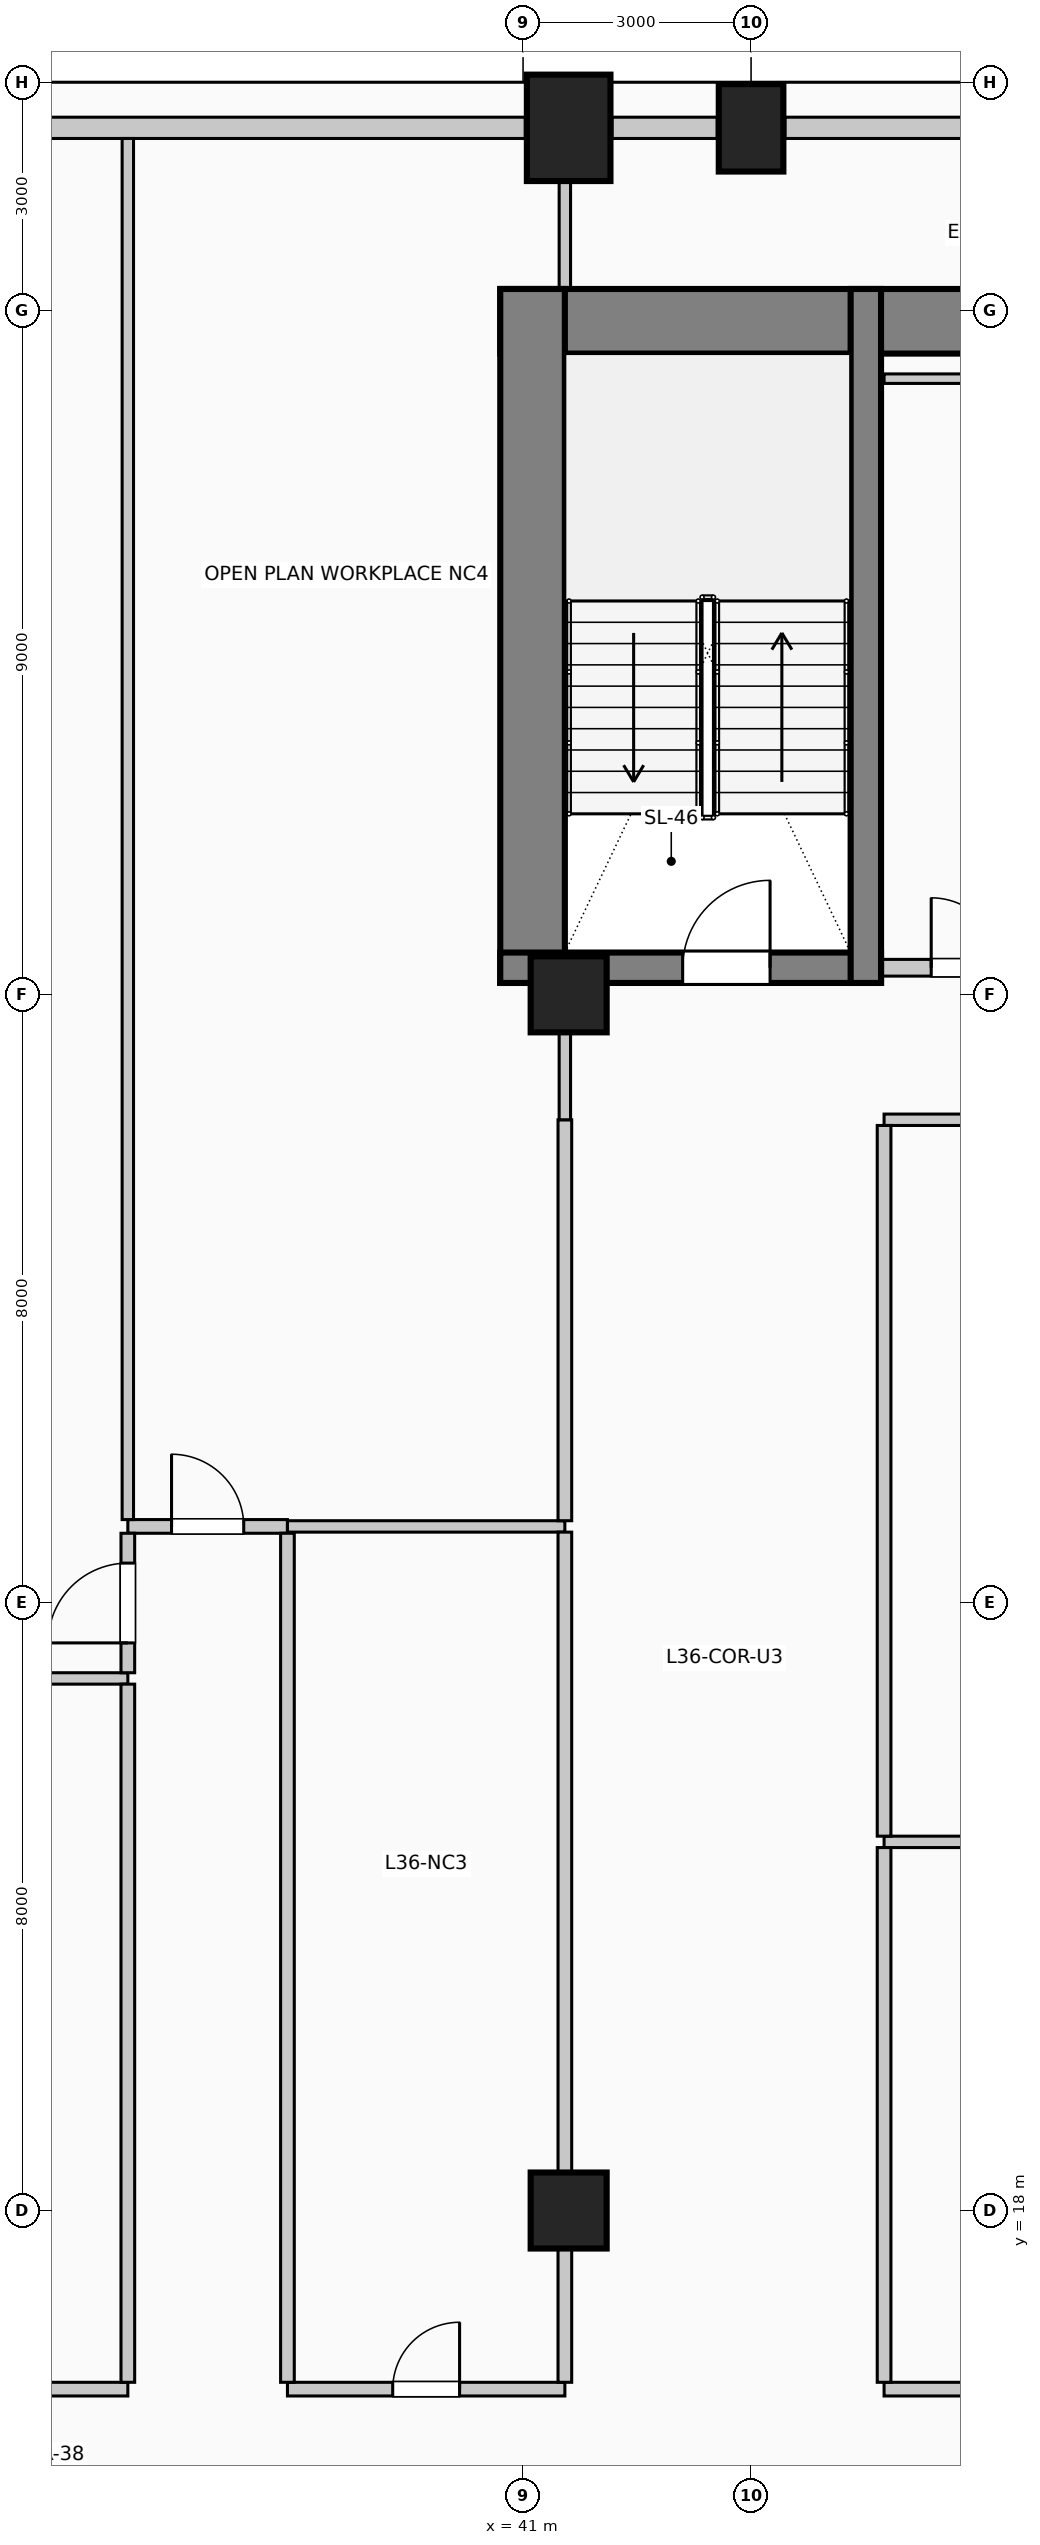
"""IFC4 building model, lengths in metres.
Left out: names, types, materials, properties, quantities, classifications, styles, units other than length and angle.
Written with IfcOpenShell. Run it as: python <this file> out.ifc"""

import sys

from ifc_helpers import new_model, si_unit, direction, frame, frame_2d, origin, origin_2d, place, context, subcontext, project, spatial, rectangle, circle, extrude, element, fill, save


model = new_model("IFC4")
c1 = context("Model", 3, precision=1e-05, world=origin(), true_north=direction((0.0, 1.0)))
c2 = subcontext(c1, "Body", "Model", "MODEL_VIEW")
j1 = project(units=[si_unit("LENGTHUNIT", "METRE"), si_unit("PLANEANGLEUNIT", "RADIAN")], contexts=[c1])
p1 = place(None, origin())
s1 = spatial("IfcSite", under=j1, at=p1, CompositionType="ELEMENT")
p2 = place(p1, origin())
s2 = spatial("IfcBuilding", under=s1, at=p2, CompositionType="ELEMENT")
p3 = place(p2, frame((0.0, 0.0, 148.6)))
s3 = spatial("IfcBuildingStorey", under=s2, at=p3, CompositionType="ELEMENT", Elevation=148.6)
p4 = place(p3, frame((40.7, 42.855, 0.0), z_axis=(0.0, 0.0, 1.0), x_axis=(1.0, 0.0, 0.0)))
e1 = element("IfcWall", 1, at=p4, inside=s3, PredefinedType="SHEAR", context=c2, shape_type="SweptSolid", body=[
    extrude(rectangle(XDim=14.6, YDim=0.85, at=frame_2d((7.3, 0.0))), origin(), (0.0, 0.0, 1.0), 4.0),
])
p5 = place(p3, frame((41.125, 34.15, 0.0), z_axis=(0.0, 0.0, 1.0), x_axis=(0.0, 1.0, 0.0)))
e2 = element("IfcWall", 2, at=p5, inside=s3, PredefinedType="SHEAR", context=c2, shape_type="SweptSolid", body=[
    extrude(rectangle(XDim=9.13, YDim=0.85, at=frame_2d((4.565, 0.0))), origin(), (0.0, 0.0, 1.0), 4.0),
])
p6 = place(p3, frame((40.7, 34.35, 0.0), z_axis=(0.0, 0.0, 1.0), x_axis=(1.0, 0.0, 0.0)))
e3 = element("IfcWall", 3, at=p6, inside=s3, PredefinedType="SHEAR", context=c2, shape_type="SweptSolid", body=[
    extrude(rectangle(XDim=5.01, YDim=0.4, at=frame_2d((2.505, 0.0))), origin(), (0.0, 0.0, 1.0), 4.0),
])
p7 = place(p6, frame((2.4, 0.0, 0.0)))
e4 = element("IfcOpeningElement", 4, at=p7, cuts=e3, PredefinedType="OPENING", context=c2, shape_type="SweptSolid", body=[
    extrude(rectangle(XDim=1.15, YDim=2.2, at=frame_2d((0.575, 1.1))), frame((0.0, 0.21, 0.0), z_axis=(0.0, -1.0, 0.0), x_axis=(1.0, 0.0, 0.0)), (0.0, 0.0, 1.0), 0.42),
])
p8 = place(p3, frame((45.51, 34.15, 0.0), z_axis=(0.0, 0.0, 1.0), x_axis=(0.0, 1.0, 0.0)))
e5 = element("IfcWall", 5, at=p8, inside=s3, PredefinedType="SHEAR", context=c2, shape_type="SweptSolid", body=[
    extrude(rectangle(XDim=9.13, YDim=0.4, at=frame_2d((4.565, 0.0))), origin(), (0.0, 0.0, 1.0), 4.0),
])
p9 = place(p3, frame((41.6, 45.4, 0.0), z_axis=(0.0, 0.0, 1.0), x_axis=(1.0, 0.0, 0.0)))
e6 = element("IfcColumn", 6, at=p9, inside=s3, PredefinedType="COLUMN", context=c2, shape_type="SweptSolid", body=[
    extrude(rectangle(XDim=1.1, YDim=1.4, at=origin_2d()), origin(), (0.0, 0.0, 1.0), 4.0),
])
p10 = place(p3, frame((44.0, 45.4, 0.0), z_axis=(0.0, 0.0, 1.0), x_axis=(1.0, 0.0, 0.0)))
e7 = element("IfcColumn", 7, at=p10, inside=s3, PredefinedType="COLUMN", context=c2, shape_type="SweptSolid", body=[
    extrude(rectangle(XDim=0.85, YDim=1.15, at=origin_2d()), origin(), (0.0, 0.0, 1.0), 4.0),
])
for number, where, z_axis, x_axis in (
    (8, (41.6, 18.0, 0.0), (0.0, 0.0, 1.0), (1.0, 0.0, 0.0)),
    (9, (41.6, 34.0, 0.0), (0.0, 0.0, 1.0), (1.0, 0.0, 0.0)),
):
    element("IfcColumn", number, at=place(p3, frame(where, z_axis=z_axis, x_axis=x_axis)), inside=s3, PredefinedType="COLUMN", context=c2, shape_type="SweptSolid", body=[
        extrude(circle(Radius=0.5, at=origin_2d()), origin(), (0.0, 0.0, 1.0), 4.0),
    ])
p11 = place(p3, frame((34.57, 45.4, 0.0), z_axis=(0.0, 0.0, 1.0), x_axis=(1.0, 0.0, 0.0)))
e10 = element("IfcWall", 10, at=p11, inside=s3, PredefinedType="SOLIDWALL", context=c2, shape_type="SweptSolid", body=[
    extrude(rectangle(XDim=6.46, YDim=0.28, at=frame_2d((3.23, 0.0))), origin(), (0.0, 0.0, 1.0), 2.875),
])
p12 = place(p3, frame((42.17, 45.4, 0.0), z_axis=(0.0, 0.0, 1.0), x_axis=(1.0, 0.0, 0.0)))
e11 = element("IfcWall", 11, at=p12, inside=s3, PredefinedType="SOLIDWALL", context=c2, shape_type="SweptSolid", body=[
    extrude(rectangle(XDim=1.385, YDim=0.28, at=frame_2d((0.692, 0.0))), origin(), (0.0, 0.0, 1.0), 2.875),
])
p13 = place(p3, frame((44.445, 45.4, 0.0), z_axis=(0.0, 0.0, 1.0), x_axis=(1.0, 0.0, 0.0)))
e12 = element("IfcWall", 12, at=p13, inside=s3, PredefinedType="SOLIDWALL", context=c2, shape_type="SweptSolid", body=[
    extrude(rectangle(XDim=4.61, YDim=0.28, at=frame_2d((2.305, 0.0))), origin(), (0.0, 0.0, 1.0), 2.875),
])
p14 = place(p3, frame((45.72, 34.35, 0.0), z_axis=(0.0, 0.0, 1.0), x_axis=(1.0, 0.0, 0.0)))
e13 = element("IfcWall", 13, at=p14, inside=s3, PredefinedType="PARTITIONING", context=c2, shape_type="SweptSolid", body=[
    extrude(rectangle(XDim=4.56, YDim=0.22, at=frame_2d((2.28, 0.0))), origin(), (0.0, 0.0, 1.0), 3.725),
])
p15 = place(p14, frame((0.65, 0.0, 0.0)))
e14 = element("IfcOpeningElement", 14, at=p15, cuts=e13, PredefinedType="OPENING", context=c2, shape_type="SweptSolid", body=[
    extrude(rectangle(XDim=0.92, YDim=2.1, at=frame_2d((0.46, 1.05))), frame((0.0, 0.12, 0.0), z_axis=(0.0, -1.0, 0.0), x_axis=(1.0, 0.0, 0.0)), (0.0, 0.0, 1.0), 0.24),
])
p16 = place(p14, frame((2.95, 0.0, 0.0)))
e15 = element("IfcOpeningElement", 15, at=p16, cuts=e13, PredefinedType="OPENING", context=c2, shape_type="SweptSolid", body=[
    extrude(rectangle(XDim=0.88, YDim=2.1, at=frame_2d((0.44, 1.05))), frame((0.0, 0.12, 0.0), z_axis=(0.0, -1.0, 0.0), x_axis=(1.0, 0.0, 0.0)), (0.0, 0.0, 1.0), 0.24),
])
p17 = place(p3, frame((16.65, 15.65, 0.0), z_axis=(0.0, 0.0, 1.0), x_axis=(1.0, 0.0, 0.0)))
e16 = element("IfcWall", 16, at=p17, inside=s3, PredefinedType="PARTITIONING", context=c2, shape_type="SweptSolid", body=[
    extrude(rectangle(XDim=19.15, YDim=0.18, at=frame_2d((9.575, 0.0))), origin(), (0.0, 0.0, 1.0), 3.725),
])
p18 = place(p17, frame((9.1, 0.0, 0.0)))
e17 = element("IfcOpeningElement", 17, at=p18, cuts=e16, PredefinedType="OPENING", context=c2, shape_type="SweptSolid", body=[
    extrude(rectangle(XDim=0.95, YDim=2.15, at=frame_2d((0.475, 1.075))), frame((0.0, 0.1, 0.0), z_axis=(0.0, -1.0, 0.0), x_axis=(1.0, 0.0, 0.0)), (0.0, 0.0, 1.0), 0.2),
])
p19 = place(p3, frame((37.9, 15.65, 0.0), z_axis=(0.0, 0.0, 1.0), x_axis=(1.0, 0.0, 0.0)))
e18 = element("IfcWall", 18, at=p19, inside=s3, PredefinedType="PARTITIONING", context=c2, shape_type="SweptSolid", body=[
    extrude(rectangle(XDim=3.65, YDim=0.18, at=frame_2d((1.825, 0.0))), origin(), (0.0, 0.0, 1.0), 3.725),
])
p20 = place(p19, frame((1.385, 0.0, 0.0)))
e19 = element("IfcOpeningElement", 19, at=p20, cuts=e18, PredefinedType="OPENING", context=c2, shape_type="SweptSolid", body=[
    extrude(rectangle(XDim=0.88, YDim=2.1, at=frame_2d((0.44, 1.05))), frame((0.0, 0.1, 0.0), z_axis=(0.0, -1.0, 0.0), x_axis=(1.0, 0.0, 0.0)), (0.0, 0.0, 1.0), 0.2),
])
p21 = place(p3, frame((45.75, 15.65, 0.0), z_axis=(0.0, 0.0, 1.0), x_axis=(1.0, 0.0, 0.0)))
e20 = element("IfcWall", 20, at=p21, inside=s3, PredefinedType="PARTITIONING", context=c2, shape_type="SweptSolid", body=[
    extrude(rectangle(XDim=11.51, YDim=0.18, at=frame_2d((5.755, 0.0))), origin(), (0.0, 0.0, 1.0), 3.725),
])
p22 = place(p21, frame((5.315, 0.0, 0.0)))
e21 = element("IfcOpeningElement", 21, at=p22, cuts=e20, PredefinedType="OPENING", context=c2, shape_type="SweptSolid", body=[
    extrude(rectangle(XDim=0.88, YDim=2.1, at=frame_2d((0.44, 1.05))), frame((0.0, 0.1, 0.0), z_axis=(0.0, -1.0, 0.0), x_axis=(1.0, 0.0, 0.0)), (0.0, 0.0, 1.0), 0.2),
])
p23 = place(p3, frame((45.75, 22.85, 0.0), z_axis=(0.0, 0.0, 1.0), x_axis=(1.0, 0.0, 0.0)))
e22 = element("IfcWall", 22, at=p23, inside=s3, PredefinedType="PARTITIONING", context=c2, shape_type="SweptSolid", body=[
    extrude(rectangle(XDim=11.51, YDim=0.15, at=frame_2d((5.755, 0.0))), origin(), (0.0, 0.0, 1.0), 3.725),
])
p24 = place(p3, frame((16.65, 25.0, 0.0), z_axis=(0.0, 0.0, 1.0), x_axis=(1.0, 0.0, 0.0)))
e23 = element("IfcWall", 23, at=p24, inside=s3, PredefinedType="PARTITIONING", context=c2, shape_type="SweptSolid", body=[
    extrude(rectangle(XDim=19.15, YDim=0.15, at=frame_2d((9.575, 0.0))), origin(), (0.0, 0.0, 1.0), 3.725),
])
p25 = place(p3, frame((35.8, 27.0, 0.0), z_axis=(0.0, 0.0, 1.0), x_axis=(1.0, 0.0, 0.0)))
e24 = element("IfcWall", 24, at=p25, inside=s3, PredefinedType="PARTITIONING", context=c2, shape_type="SweptSolid", body=[
    extrude(rectangle(XDim=2.1, YDim=0.18, at=frame_2d((1.05, 0.0))), origin(), (0.0, 0.0, 1.0), 3.725),
])
p26 = place(p25, frame((0.575, 0.0, 0.0)))
e25 = element("IfcOpeningElement", 25, at=p26, cuts=e24, PredefinedType="OPENING", context=c2, shape_type="SweptSolid", body=[
    extrude(rectangle(XDim=0.95, YDim=2.15, at=frame_2d((0.475, 1.075))), frame((0.0, 0.1, 0.0), z_axis=(0.0, -1.0, 0.0), x_axis=(1.0, 0.0, 0.0)), (0.0, 0.0, 1.0), 0.2),
])
p27 = place(p3, frame((37.9, 27.0, 0.0), z_axis=(0.0, 0.0, 1.0), x_axis=(1.0, 0.0, 0.0)))
e26 = element("IfcWall", 26, at=p27, inside=s3, PredefinedType="PARTITIONING", context=c2, shape_type="SweptSolid", body=[
    extrude(rectangle(XDim=3.65, YDim=0.15, at=frame_2d((1.825, 0.0))), origin(), (0.0, 0.0, 1.0), 3.725),
])
p28 = place(p3, frame((45.75, 32.35, 0.0), z_axis=(0.0, 0.0, 1.0), x_axis=(1.0, 0.0, 0.0)))
e27 = element("IfcWall", 27, at=p28, inside=s3, PredefinedType="PARTITIONING", context=c2, shape_type="SweptSolid", body=[
    extrude(rectangle(XDim=8.7, YDim=0.15, at=frame_2d((4.35, 0.0))), origin(), (0.0, 0.0, 1.0), 3.725),
])
p29 = place(p28, frame((3.875, 0.0, 0.0)))
e28 = element("IfcOpeningElement", 28, at=p29, cuts=e27, PredefinedType="OPENING", context=c2, shape_type="SweptSolid", body=[
    extrude(rectangle(XDim=0.95, YDim=2.15, at=frame_2d((0.475, 1.075))), frame((0.0, 0.085, 0.0), z_axis=(0.0, -1.0, 0.0), x_axis=(1.0, 0.0, 0.0)), (0.0, 0.0, 1.0), 0.17),
])
p30 = place(p3, frame((45.75, 42.1, 0.0), z_axis=(0.0, 0.0, 1.0), x_axis=(1.0, 0.0, 0.0)))
e29 = element("IfcWall", 29, at=p30, inside=s3, PredefinedType="PARTITIONING", context=c2, shape_type="SweptSolid", body=[
    extrude(rectangle(XDim=2.25, YDim=0.125, at=frame_2d((1.125, 0.0))), origin(), (0.0, 0.0, 1.0), 3.725),
])
p31 = place(p3, frame((35.8, 15.74, 0.0), z_axis=(0.0, 0.0, 1.0), x_axis=(0.0, 1.0, 0.0)))
e30 = element("IfcWall", 30, at=p31, inside=s3, PredefinedType="PARTITIONING", context=c2, shape_type="SweptSolid", body=[
    extrude(rectangle(XDim=9.185, YDim=0.18, at=frame_2d((4.593, 0.0))), origin(), (0.0, 0.0, 1.0), 3.725),
])
p32 = place(p3, frame((35.8, 25.075, 0.0), z_axis=(0.0, 0.0, 1.0), x_axis=(0.0, 1.0, 0.0)))
e31 = element("IfcWall", 31, at=p32, inside=s3, PredefinedType="PARTITIONING", context=c2, shape_type="SweptSolid", body=[
    extrude(rectangle(XDim=1.835, YDim=0.18, at=frame_2d((0.917, 0.0))), origin(), (0.0, 0.0, 1.0), 3.725),
])
p33 = place(p32, frame((0.393, 0.0, 0.0)))
e32 = element("IfcOpeningElement", 32, at=p33, cuts=e31, PredefinedType="OPENING", context=c2, shape_type="SweptSolid", body=[
    extrude(rectangle(XDim=1.05, YDim=2.15, at=frame_2d((0.525, 1.075))), frame((0.0, 0.1, 0.0), z_axis=(0.0, -1.0, 0.0), x_axis=(1.0, 0.0, 0.0)), (0.0, 0.0, 1.0), 0.2),
])
p34 = place(p3, frame((35.8, 27.09, 0.0), z_axis=(0.0, 0.0, 1.0), x_axis=(0.0, 1.0, 0.0)))
e33 = element("IfcWall", 33, at=p34, inside=s3, PredefinedType="PARTITIONING", context=c2, shape_type="SweptSolid", body=[
    extrude(rectangle(XDim=18.17, YDim=0.15, at=frame_2d((9.085, 0.0))), origin(), (0.0, 0.0, 1.0), 3.725),
])
p35 = place(p3, frame((37.9, 15.74, 0.0), z_axis=(0.0, 0.0, 1.0), x_axis=(0.0, 1.0, 0.0)))
e34 = element("IfcWall", 34, at=p35, inside=s3, PredefinedType="PARTITIONING", context=c2, shape_type="SweptSolid", body=[
    extrude(rectangle(XDim=11.17, YDim=0.18, at=frame_2d((5.585, 0.0))), origin(), (0.0, 0.0, 1.0), 3.725),
])
p36 = place(p3, frame((41.55, 15.74, 0.0), z_axis=(0.0, 0.0, 1.0), x_axis=(0.0, 1.0, 0.0)))
e35 = element("IfcWall", 35, at=p36, inside=s3, PredefinedType="PARTITIONING", context=c2, shape_type="SweptSolid", body=[
    extrude(rectangle(XDim=1.76, YDim=0.18, at=frame_2d((0.88, 0.0))), origin(), (0.0, 0.0, 1.0), 3.07),
])
p37 = place(p3, frame((41.55, 18.5, 0.0), z_axis=(0.0, 0.0, 1.0), x_axis=(0.0, 1.0, 0.0)))
e36 = element("IfcWall", 36, at=p37, inside=s3, PredefinedType="PARTITIONING", context=c2, shape_type="SweptSolid", body=[
    extrude(rectangle(XDim=8.425, YDim=0.18, at=frame_2d((4.212, 0.0))), origin(), (0.0, 0.0, 1.0), 3.07),
])
p38 = place(p3, frame((41.55, 27.075, 0.0), z_axis=(0.0, 0.0, 1.0), x_axis=(0.0, 1.0, 0.0)))
e37 = element("IfcWall", 37, at=p38, inside=s3, PredefinedType="PARTITIONING", context=c2, shape_type="SweptSolid", body=[
    extrude(rectangle(XDim=5.275, YDim=0.18, at=frame_2d((2.638, 0.0))), origin(), (0.0, 0.0, 1.0), 3.07),
])
p39 = place(p3, frame((41.55, 32.35, 0.0), z_axis=(0.0, 0.0, 1.0), x_axis=(0.0, 1.0, 0.0)))
e38 = element("IfcWall", 38, at=p39, inside=s3, PredefinedType="PARTITIONING", context=c2, shape_type="SweptSolid", body=[
    extrude(rectangle(XDim=1.15, YDim=0.15, at=frame_2d((0.575, 0.0))), origin(), (0.0, 0.0, 1.0), 3.07),
])
p40 = place(p3, frame((41.55, 43.28, 0.0), z_axis=(0.0, 0.0, 1.0), x_axis=(0.0, 1.0, 0.0)))
e39 = element("IfcWall", 39, at=p40, inside=s3, PredefinedType="PARTITIONING", context=c2, shape_type="SweptSolid", body=[
    extrude(rectangle(XDim=1.42, YDim=0.15, at=frame_2d((0.71, 0.0))), origin(), (0.0, 0.0, 1.0), 3.725),
])
p41 = place(p3, frame((45.75, 15.74, 0.0), z_axis=(0.0, 0.0, 1.0), x_axis=(0.0, 1.0, 0.0)))
e40 = element("IfcWall", 40, at=p41, inside=s3, PredefinedType="PARTITIONING", context=c2, shape_type="SweptSolid", body=[
    extrude(rectangle(XDim=7.035, YDim=0.18, at=frame_2d((3.518, 0.0))), origin(), (0.0, 0.0, 1.0), 3.725),
])
p42 = place(p3, frame((45.75, 22.925, 0.0), z_axis=(0.0, 0.0, 1.0), x_axis=(0.0, 1.0, 0.0)))
e41 = element("IfcWall", 41, at=p42, inside=s3, PredefinedType="PARTITIONING", context=c2, shape_type="SweptSolid", body=[
    extrude(rectangle(XDim=9.35, YDim=0.18, at=frame_2d((4.675, 0.0))), origin(), (0.0, 0.0, 1.0), 3.725),
])
p43 = place(p7, origin())
e42 = element("IfcDoor", 42, at=p43, inside=s3, OperationType="SINGLE_SWING_RIGHT", PredefinedType="DOOR", context=c2, shape_type="SweptSolid", body=[
    extrude(rectangle(XDim=1.15, YDim=2.2, at=frame_2d((0.575, 1.1))), frame((0.0, 0.025, 0.0), z_axis=(0.0, -1.0, 0.0), x_axis=(1.0, 0.0, 0.0)), (0.0, 0.0, 1.0), 0.05),
])
fill(e4, e42)
p44 = place(p15, origin())
e43 = element("IfcDoor", 43, at=p44, inside=s3, OperationType="SINGLE_SWING_LEFT", PredefinedType="DOOR", context=c2, shape_type="SweptSolid", body=[
    extrude(rectangle(XDim=0.92, YDim=2.1, at=frame_2d((0.46, 1.05))), frame((0.0, 0.025, 0.0), z_axis=(0.0, -1.0, 0.0), x_axis=(1.0, 0.0, 0.0)), (0.0, 0.0, 1.0), 0.05),
])
fill(e14, e43)
p45 = place(p20, origin())
e44 = element("IfcDoor", 44, at=p45, inside=s3, OperationType="SINGLE_SWING_RIGHT", PredefinedType="DOOR", context=c2, shape_type="SweptSolid", body=[
    extrude(rectangle(XDim=0.88, YDim=2.1, at=frame_2d((0.44, 1.05))), frame((0.0, 0.025, 0.0), z_axis=(0.0, -1.0, 0.0), x_axis=(1.0, 0.0, 0.0)), (0.0, 0.0, 1.0), 0.05),
])
fill(e19, e44)
p46 = place(p26, origin())
e45 = element("IfcDoor", 45, at=p46, inside=s3, OperationType="SINGLE_SWING_LEFT", PredefinedType="DOOR", context=c2, shape_type="SweptSolid", body=[
    extrude(rectangle(XDim=0.95, YDim=2.15, at=frame_2d((0.475, 1.075))), frame((0.0, 0.025, 0.0), z_axis=(0.0, -1.0, 0.0), x_axis=(1.0, 0.0, 0.0)), (0.0, 0.0, 1.0), 0.05),
])
fill(e25, e45)
p47 = place(p33, origin())
e46 = element("IfcDoor", 46, at=p47, inside=s3, OperationType="SINGLE_SWING_LEFT", PredefinedType="DOOR", context=c2, shape_type="SweptSolid", body=[
    extrude(rectangle(XDim=1.05, YDim=2.15, at=frame_2d((0.525, 1.075))), frame((0.0, 0.025, 0.0), z_axis=(0.0, -1.0, 0.0), x_axis=(1.0, 0.0, 0.0)), (0.0, 0.0, 1.0), 0.05),
])
fill(e32, e46)
save(model, sys.argv[1])
